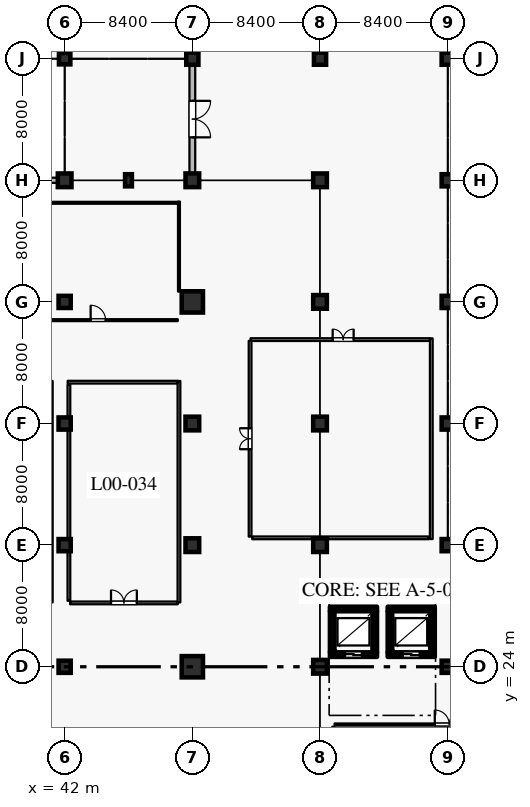
"""IFC4 building model, lengths in metres.
Left out: names, types, materials, properties, quantities, classifications, styles, units other than length and angle.
Written with IfcOpenShell. Run it as: python <this file> out.ifc"""

import sys

from ifc_helpers import new_model, si_unit, direction, frame, frame_2d, origin, origin_2d, place, context, subcontext, project, spatial, rectangle, circle, extrude, element, fill, save


model = new_model("IFC4")
c1 = context("Model", 3, precision=1e-05, world=origin(), true_north=direction((0.0, 1.0)))
c2 = subcontext(c1, "Body", "Model", "MODEL_VIEW")
j1 = project(units=[si_unit("LENGTHUNIT", "METRE"), si_unit("PLANEANGLEUNIT", "RADIAN")], contexts=[c1])
p1 = place(None, origin())
s1 = spatial("IfcSite", under=j1, at=p1, CompositionType="ELEMENT")
p2 = place(p1, origin())
s2 = spatial("IfcBuilding", under=s1, at=p2, CompositionType="ELEMENT")
p3 = place(p2, origin())
s3 = spatial("IfcBuildingStorey", under=s2, at=p3, CompositionType="ELEMENT", Elevation=0.0)
for number, where, z_axis, x_axis in (
    (1, (42.0, 24.0, 0.0), (0.0, 0.0, 1.0), (1.0, 0.0, 0.0)),
    (2, (42.0, 32.0, 0.0), (0.0, 0.0, 1.0), (1.0, 0.0, 0.0)),
    (3, (42.0, 40.0, 0.0), (0.0, 0.0, 1.0), (1.0, 0.0, 0.0)),
    (4, (42.0, 48.0, 0.0), (0.0, 0.0, 1.0), (1.0, 0.0, 0.0)),
):
    element("IfcColumn", number, at=place(p3, frame(where, z_axis=z_axis, x_axis=x_axis)), inside=s3, PredefinedType="COLUMN", context=c2, shape_type="SweptSolid", body=[
        extrude(rectangle(XDim=0.8, YDim=0.8, at=origin_2d()), origin(), (0.0, 0.0, 1.0), 6.0),
    ])
p4 = place(p3, frame((42.0, 56.0, 0.0), z_axis=(0.0, 0.0, 1.0), x_axis=(1.0, 0.0, 0.0)))
e5 = element("IfcColumn", 5, at=p4, inside=s3, PredefinedType="COLUMN", context=c2, shape_type="SweptSolid", body=[
    extrude(rectangle(XDim=0.9, YDim=0.9, at=origin_2d()), origin(), (0.0, 0.0, 1.0), 6.0),
])
p5 = place(p3, frame((42.0, 64.0, 0.0), z_axis=(0.0, 0.0, 1.0), x_axis=(1.0, 0.0, 0.0)))
e6 = element("IfcColumn", 6, at=p5, inside=s3, PredefinedType="COLUMN", context=c2, shape_type="SweptSolid", body=[
    extrude(rectangle(XDim=0.75, YDim=0.75, at=origin_2d()), origin(), (0.0, 0.0, 1.0), 6.0),
])
p6 = place(p3, frame((46.2, 56.0, 0.0), z_axis=(0.0, 0.0, 1.0), x_axis=(1.0, 0.0, 0.0)))
e7 = element("IfcColumn", 7, at=p6, inside=s3, PredefinedType="PILASTER", context=c2, shape_type="SweptSolid", body=[
    extrude(rectangle(XDim=0.45, YDim=0.8, at=origin_2d()), origin(), (0.0, 0.0, 1.0), 6.0),
])
p7 = place(p3, frame((50.4, 24.0, 0.0), z_axis=(0.0, 0.0, 1.0), x_axis=(1.0, 0.0, 0.0)))
e8 = element("IfcColumn", 8, at=p7, inside=s3, PredefinedType="COLUMN", context=c2, shape_type="SweptSolid", body=[
    extrude(circle(Radius=0.7, at=origin_2d()), origin(), (0.0, 0.0, 1.0), 6.0),
])
for number, where, z_axis, x_axis in (
    (9, (50.4, 32.0, 0.0), (0.0, 0.0, 1.0), (1.0, 0.0, 0.0)),
    (10, (50.4, 40.0, 0.0), (0.0, 0.0, 1.0), (1.0, 0.0, 0.0)),
):
    element("IfcColumn", number, at=place(p3, frame(where, z_axis=z_axis, x_axis=x_axis)), inside=s3, PredefinedType="COLUMN", context=c2, shape_type="SweptSolid", body=[
        extrude(rectangle(XDim=0.9, YDim=0.9, at=origin_2d()), origin(), (0.0, 0.0, 1.0), 6.0),
    ])
p8 = place(p3, frame((50.4, 48.0, 0.0), z_axis=(0.0, 0.0, 1.0), x_axis=(1.0, 0.0, 0.0)))
e11 = element("IfcColumn", 11, at=p8, inside=s3, PredefinedType="COLUMN", context=c2, shape_type="SweptSolid", body=[
    extrude(circle(Radius=0.7, at=origin_2d()), origin(), (0.0, 0.0, 1.0), 6.0),
])
p9 = place(p3, frame((50.4, 56.0, 0.0), z_axis=(0.0, 0.0, 1.0), x_axis=(1.0, 0.0, 0.0)))
e12 = element("IfcColumn", 12, at=p9, inside=s3, PredefinedType="COLUMN", context=c2, shape_type="SweptSolid", body=[
    extrude(rectangle(XDim=0.9, YDim=0.9, at=origin_2d()), origin(), (0.0, 0.0, 1.0), 6.0),
])
p10 = place(p3, frame((50.4, 64.0, 0.0), z_axis=(0.0, 0.0, 1.0), x_axis=(1.0, 0.0, 0.0)))
e13 = element("IfcColumn", 13, at=p10, inside=s3, PredefinedType="COLUMN", context=c2, shape_type="SweptSolid", body=[
    extrude(rectangle(XDim=0.8, YDim=0.8, at=origin_2d()), origin(), (0.0, 0.0, 1.0), 6.0),
])
for number, where, z_axis, x_axis in (
    (14, (58.8, 24.0, 0.0), (0.0, 0.0, 1.0), (1.0, 0.0, 0.0)),
    (15, (58.8, 32.0, 0.0), (0.0, 0.0, 1.0), (1.0, 0.0, 0.0)),
    (16, (58.8, 40.0, 0.0), (0.0, 0.0, 1.0), (1.0, 0.0, 0.0)),
    (17, (58.8, 48.0, 0.0), (0.0, 0.0, 1.0), (1.0, 0.0, 0.0)),
    (18, (58.8, 56.0, 0.0), (0.0, 0.0, 1.0), (1.0, 0.0, 0.0)),
):
    element("IfcColumn", number, at=place(p3, frame(where, z_axis=z_axis, x_axis=x_axis)), inside=s3, PredefinedType="COLUMN", context=c2, shape_type="SweptSolid", body=[
        extrude(rectangle(XDim=0.9, YDim=0.9, at=origin_2d()), origin(), (0.0, 0.0, 1.0), 6.0),
    ])
for number, where, z_axis, x_axis in (
    (19, (58.8, 64.0, 0.0), (0.0, 0.0, 1.0), (1.0, 0.0, 0.0)),
    (20, (67.2, 24.0, 0.0), (0.0, 0.0, 1.0), (1.0, 0.0, 0.0)),
    (21, (67.2, 32.0, 0.0), (0.0, 0.0, 1.0), (1.0, 0.0, 0.0)),
    (22, (67.2, 40.0, 0.0), (0.0, 0.0, 1.0), (1.0, 0.0, 0.0)),
    (23, (67.2, 48.0, 0.0), (0.0, 0.0, 1.0), (1.0, 0.0, 0.0)),
    (24, (67.2, 56.0, 0.0), (0.0, 0.0, 1.0), (1.0, 0.0, 0.0)),
    (25, (67.2, 64.0, 0.0), (0.0, 0.0, 1.0), (1.0, 0.0, 0.0)),
):
    element("IfcColumn", number, at=place(p3, frame(where, z_axis=z_axis, x_axis=x_axis)), inside=s3, PredefinedType="COLUMN", context=c2, shape_type="SweptSolid", body=[
        extrude(rectangle(XDim=0.8, YDim=0.8, at=origin_2d()), origin(), (0.0, 0.0, 1.0), 6.0),
    ])
p11 = place(p3, frame((38.025, 56.0, 0.0), z_axis=(0.0, 0.0, 1.0), x_axis=(1.0, 0.0, 0.0)))
e26 = element("IfcWall", 26, at=p11, inside=s3, PredefinedType="SOLIDWALL", context=c2, shape_type="SweptSolid", body=[
    extrude(rectangle(XDim=3.525, YDim=0.34, at=frame_2d((1.763, 0.0))), origin(), (0.0, 0.0, 1.0), 4.98),
])
p12 = place(p11, frame((0.812, 0.0, 1.25)))
e27 = element("IfcOpeningElement", 27, at=p12, cuts=e26, PredefinedType="OPENING", context=c2, shape_type="SweptSolid", body=[
    extrude(rectangle(XDim=1.9, YDim=1.4, at=frame_2d((0.95, 0.7))), frame((0.0, 0.18, 0.0), z_axis=(0.0, -1.0, 0.0), x_axis=(1.0, 0.0, 0.0)), (0.0, 0.0, 1.0), 0.36),
])
p13 = place(p3, frame((42.0, 71.625, 0.0), z_axis=(0.0, 0.0, 1.0), x_axis=(0.0, -1.0, 0.0)))
e28 = element("IfcWall", 28, at=p13, inside=s3, PredefinedType="SOLIDWALL", context=c2, shape_type="SweptSolid", body=[
    extrude(rectangle(XDim=7.25, YDim=0.28, at=frame_2d((3.625, 0.0))), origin(), (0.0, 0.0, 1.0), 5.0),
])
p14 = place(p13, frame((2.325, 0.0, 1.0)))
e29 = element("IfcOpeningElement", 29, at=p14, cuts=e28, PredefinedType="OPENING", context=c2, shape_type="SweptSolid", body=[
    extrude(rectangle(XDim=2.6, YDim=1.85, at=frame_2d((1.3, 0.925))), frame((0.0, 0.15, 0.0), z_axis=(0.0, -1.0, 0.0), x_axis=(1.0, 0.0, 0.0)), (0.0, 0.0, 1.0), 0.3),
])
p15 = place(p3, frame((50.4, 63.6, 0.0), z_axis=(0.0, 0.0, 1.0), x_axis=(0.0, -1.0, 0.0)))
e30 = element("IfcWall", 30, at=p15, inside=s3, PredefinedType="SOLIDWALL", context=c2, shape_type="SweptSolid", body=[
    extrude(rectangle(XDim=7.15, YDim=0.38, at=frame_2d((3.575, 0.0))), origin(), (0.0, 0.0, 1.0), 5.0),
])
p16 = place(p15, frame((2.375, 0.0, 0.0)))
e31 = element("IfcOpeningElement", 31, at=p16, cuts=e30, PredefinedType="OPENING", context=c2, shape_type="SweptSolid", body=[
    extrude(rectangle(XDim=2.4, YDim=2.6, at=frame_2d((1.2, 1.3))), frame((0.0, 0.2, 0.0), z_axis=(0.0, -1.0, 0.0), x_axis=(1.0, 0.0, 0.0)), (0.0, 0.0, 1.0), 0.4),
])
p17 = place(p3, frame((50.4, 64.4, 0.0), z_axis=(0.0, 0.0, 1.0), x_axis=(0.0, 1.0, 0.0)))
e32 = element("IfcWall", 32, at=p17, inside=s3, PredefinedType="SOLIDWALL", context=c2, shape_type="SweptSolid", body=[
    extrude(rectangle(XDim=7.2, YDim=0.38, at=frame_2d((3.6, 0.0))), origin(), (0.0, 0.0, 1.0), 5.7),
])
p18 = place(p17, frame((2.2, 0.0, 0.0)))
e33 = element("IfcOpeningElement", 33, at=p18, cuts=e32, PredefinedType="OPENING", context=c2, shape_type="SweptSolid", body=[
    extrude(rectangle(XDim=2.8, YDim=2.8, at=frame_2d((1.4, 1.4))), frame((0.0, 0.2, 0.0), z_axis=(0.0, -1.0, 0.0), x_axis=(1.0, 0.0, 0.0)), (0.0, 0.0, 1.0), 0.4),
])
p19 = place(p3, frame((59.45, 24.8, 0.0), z_axis=(0.0, 0.0, 1.0), x_axis=(1.0, 0.0, 0.0)))
e34 = element("IfcWall", 34, at=p19, inside=s3, PredefinedType="SHEAR", context=c2, shape_type="SweptSolid", body=[
    extrude(rectangle(XDim=3.1, YDim=0.3, at=frame_2d((1.55, 0.0))), origin(), (0.0, 0.0, 1.0), 5.675),
])
p20 = place(p19, frame((1.0, 0.0, 0.0)))
e35 = element("IfcOpeningElement", 35, at=p20, cuts=e34, PredefinedType="OPENING", context=c2, shape_type="SweptSolid", body=[
    extrude(rectangle(XDim=1.1, YDim=2.2, at=frame_2d((0.55, 1.1))), frame((0.0, 0.16, 0.0), z_axis=(0.0, -1.0, 0.0), x_axis=(1.0, 0.0, 0.0)), (0.0, 0.0, 1.0), 0.32),
])
p21 = place(p3, frame((62.4, 24.955, 0.0), z_axis=(0.0, 0.0, 1.0), x_axis=(0.0, 1.0, 0.0)))
e36 = element("IfcWall", 36, at=p21, inside=s3, PredefinedType="SHEAR", context=c2, shape_type="SweptSolid", body=[
    extrude(rectangle(XDim=2.69, YDim=0.3, at=frame_2d((1.345, 0.0))), origin(), (0.0, 0.0, 1.0), 5.675),
])
p22 = place(p3, frame((62.55, 27.8, 0.0), z_axis=(0.0, 0.0, 1.0), x_axis=(-1.0, 0.0, 0.0)))
e37 = element("IfcWall", 37, at=p22, inside=s3, PredefinedType="SHEAR", context=c2, shape_type="SweptSolid", body=[
    extrude(rectangle(XDim=3.1, YDim=0.3, at=frame_2d((1.55, 0.0))), origin(), (0.0, 0.0, 1.0), 5.675),
])
p23 = place(p3, frame((59.6, 27.645, 0.0), z_axis=(0.0, 0.0, 1.0), x_axis=(0.0, -1.0, 0.0)))
e38 = element("IfcWall", 38, at=p23, inside=s3, PredefinedType="SHEAR", context=c2, shape_type="SweptSolid", body=[
    extrude(rectangle(XDim=2.69, YDim=0.3, at=frame_2d((1.345, 0.0))), origin(), (0.0, 0.0, 1.0), 5.675),
])
p24 = place(p3, frame((63.25, 24.8, 0.0), z_axis=(0.0, 0.0, 1.0), x_axis=(1.0, 0.0, 0.0)))
e39 = element("IfcWall", 39, at=p24, inside=s3, PredefinedType="SHEAR", context=c2, shape_type="SweptSolid", body=[
    extrude(rectangle(XDim=3.1, YDim=0.3, at=frame_2d((1.55, 0.0))), origin(), (0.0, 0.0, 1.0), 5.675),
])
p25 = place(p24, frame((1.0, 0.0, 0.0)))
e40 = element("IfcOpeningElement", 40, at=p25, cuts=e39, PredefinedType="OPENING", context=c2, shape_type="SweptSolid", body=[
    extrude(rectangle(XDim=1.1, YDim=2.2, at=frame_2d((0.55, 1.1))), frame((0.0, 0.16, 0.0), z_axis=(0.0, -1.0, 0.0), x_axis=(1.0, 0.0, 0.0)), (0.0, 0.0, 1.0), 0.32),
])
p26 = place(p3, frame((66.2, 24.955, 0.0), z_axis=(0.0, 0.0, 1.0), x_axis=(0.0, 1.0, 0.0)))
e41 = element("IfcWall", 41, at=p26, inside=s3, PredefinedType="SHEAR", context=c2, shape_type="SweptSolid", body=[
    extrude(rectangle(XDim=2.69, YDim=0.3, at=frame_2d((1.345, 0.0))), origin(), (0.0, 0.0, 1.0), 5.675),
])
p27 = place(p3, frame((66.35, 27.8, 0.0), z_axis=(0.0, 0.0, 1.0), x_axis=(-1.0, 0.0, 0.0)))
e42 = element("IfcWall", 42, at=p27, inside=s3, PredefinedType="SHEAR", context=c2, shape_type="SweptSolid", body=[
    extrude(rectangle(XDim=3.1, YDim=0.3, at=frame_2d((1.55, 0.0))), origin(), (0.0, 0.0, 1.0), 5.675),
])
p28 = place(p3, frame((63.4, 27.645, 0.0), z_axis=(0.0, 0.0, 1.0), x_axis=(0.0, -1.0, 0.0)))
e43 = element("IfcWall", 43, at=p28, inside=s3, PredefinedType="SHEAR", context=c2, shape_type="SweptSolid", body=[
    extrude(rectangle(XDim=2.69, YDim=0.3, at=frame_2d((1.345, 0.0))), origin(), (0.0, 0.0, 1.0), 5.675),
])
p29 = place(p3, frame((42.36, 28.2, 0.0), z_axis=(0.0, 0.0, 1.0), x_axis=(1.0, 0.0, 0.0)))
e44 = element("IfcWall", 44, at=p29, inside=s3, PredefinedType="PARTITIONING", context=c2, shape_type="SweptSolid", body=[
    extrude(rectangle(XDim=7.08, YDim=0.18, at=frame_2d((3.54, 0.0))), origin(), (0.0, 0.0, 1.0), 5.675),
])
p30 = place(p29, frame((2.69, 0.0, 0.0)))
e45 = element("IfcOpeningElement", 45, at=p30, cuts=e44, PredefinedType="OPENING", context=c2, shape_type="SweptSolid", body=[
    extrude(rectangle(XDim=1.7, YDim=2.3, at=frame_2d((0.85, 1.15))), frame((0.0, 0.1, 0.0), z_axis=(0.0, -1.0, 0.0), x_axis=(1.0, 0.0, 0.0)), (0.0, 0.0, 1.0), 0.2),
])
p31 = place(p3, frame((42.28, 28.34, 0.0), z_axis=(0.0, 0.0, 1.0), x_axis=(0.0, 1.0, 0.0)))
e46 = element("IfcWall", 46, at=p31, inside=s3, PredefinedType="PARTITIONING", context=c2, shape_type="SweptSolid", body=[
    extrude(rectangle(XDim=14.21, YDim=0.18, at=frame_2d((7.105, 0.0))), origin(), (0.0, 0.0, 1.0), 5.675),
])
p32 = place(p3, frame((38.96, 46.8, 0.0), z_axis=(0.0, 0.0, 1.0), x_axis=(1.0, 0.0, 0.0)))
e47 = element("IfcWall", 47, at=p32, inside=s3, PredefinedType="PARTITIONING", context=c2, shape_type="SweptSolid", body=[
    extrude(rectangle(XDim=10.48, YDim=0.125, at=frame_2d((5.24, 0.0))), origin(), (0.0, 0.0, 1.0), 5.675),
])
p33 = place(p32, frame((4.75, 0.0, 0.0)))
e48 = element("IfcOpeningElement", 48, at=p33, cuts=e47, PredefinedType="OPENING", context=c2, shape_type="SweptSolid", body=[
    extrude(rectangle(XDim=0.98, YDim=2.15, at=frame_2d((0.49, 1.075))), frame((0.0, 0.073, 0.0), z_axis=(0.0, -1.0, 0.0), x_axis=(1.0, 0.0, 0.0)), (0.0, 0.0, 1.0), 0.145),
])
p34 = place(p3, frame((59.76, 20.2, 0.0), z_axis=(0.0, 0.0, 1.0), x_axis=(1.0, 0.0, 0.0)))
e49 = element("IfcWall", 49, at=p34, inside=s3, PredefinedType="PARTITIONING", context=c2, shape_type="SweptSolid", body=[
    extrude(rectangle(XDim=15.08, YDim=0.14, at=frame_2d((7.54, 0.0))), origin(), (0.0, 0.0, 1.0), 5.675),
])
p35 = place(p34, frame((6.59, 0.0, 0.0)))
e50 = element("IfcOpeningElement", 50, at=p35, cuts=e49, PredefinedType="OPENING", context=c2, shape_type="SweptSolid", body=[
    extrude(rectangle(XDim=1.9, YDim=2.4, at=frame_2d((0.95, 1.2))), frame((0.0, 0.08, 0.0), z_axis=(0.0, -1.0, 0.0), x_axis=(1.0, 0.0, 0.0)), (0.0, 0.0, 1.0), 0.16),
])
p36 = place(p3, frame((59.68, 9.05, 0.0), z_axis=(0.0, 0.0, 1.0), x_axis=(0.0, 1.0, 0.0)))
e51 = element("IfcWall", 51, at=p36, inside=s3, PredefinedType="PARTITIONING", context=c2, shape_type="SweptSolid", body=[
    extrude(rectangle(XDim=11.01, YDim=0.14, at=frame_2d((5.505, 0.0))), origin(), (0.0, 0.0, 1.0), 5.675),
])
p37 = place(p3, frame((54.2, 32.56, 0.0), z_axis=(0.0, 0.0, 1.0), x_axis=(0.0, 1.0, 0.0)))
e52 = element("IfcWall", 52, at=p37, inside=s3, PredefinedType="PARTITIONING", context=c2, shape_type="SweptSolid", body=[
    extrude(rectangle(XDim=12.88, YDim=0.18, at=frame_2d((6.44, 0.0))), origin(), (0.0, 0.0, 1.0), 5.675),
])
p38 = place(p37, frame((5.75, 0.0, 0.0)))
e53 = element("IfcOpeningElement", 53, at=p38, cuts=e52, PredefinedType="OPENING", context=c2, shape_type="SweptSolid", body=[
    extrude(rectangle(XDim=1.38, YDim=2.3, at=frame_2d((0.69, 1.15))), frame((0.0, 0.1, 0.0), z_axis=(0.0, -1.0, 0.0), x_axis=(1.0, 0.0, 0.0)), (0.0, 0.0, 1.0), 0.2),
])
p39 = place(p3, frame((54.34, 32.48, 0.0), z_axis=(0.0, 0.0, 1.0), x_axis=(1.0, 0.0, 0.0)))
e54 = element("IfcWall", 54, at=p39, inside=s3, PredefinedType="PARTITIONING", context=c2, shape_type="SweptSolid", body=[
    extrude(rectangle(XDim=11.61, YDim=0.18, at=frame_2d((5.805, 0.0))), origin(), (0.0, 0.0, 1.0), 5.675),
])
for number, where, z_axis, x_axis in (
    (55, (41.12, 28.232, 0.0), (0.0, 0.0, 1.0), (0.0, 1.0, 0.0)),
    (56, (49.52, 28.232, 0.0), (0.0, 0.0, 1.0), (0.0, 1.0, 0.0)),
):
    element("IfcWall", number, at=place(p3, frame(where, z_axis=z_axis, x_axis=x_axis)), inside=s3, PredefinedType="PARTITIONING", context=c2, shape_type="SweptSolid", body=[
        extrude(rectangle(XDim=14.568, YDim=0.18, at=frame_2d((7.284, 0.0))), origin(), (0.0, 0.0, 1.0), 5.675),
    ])
p40 = place(p3, frame((42.2, 42.72, 0.0), z_axis=(0.0, 0.0, 1.0), x_axis=(1.0, 0.0, 0.0)))
e57 = element("IfcWall", 57, at=p40, inside=s3, PredefinedType="PARTITIONING", context=c2, shape_type="SweptSolid", body=[
    extrude(rectangle(XDim=7.23, YDim=0.18, at=frame_2d((3.615, 0.0))), origin(), (0.0, 0.0, 1.0), 5.675),
])
p41 = place(p3, frame((49.52, 48.679, 0.0), z_axis=(0.0, 0.0, 1.0), x_axis=(0.0, 1.0, 0.0)))
e58 = element("IfcWall", 58, at=p41, inside=s3, PredefinedType="PARTITIONING", context=c2, shape_type="SweptSolid", body=[
    extrude(rectangle(XDim=5.921, YDim=0.125, at=frame_2d((2.96, 0.0))), origin(), (0.0, 0.0, 1.0), 5.675),
])
p42 = place(p3, frame((38.8, 54.52, 0.0), z_axis=(0.0, 0.0, 1.0), x_axis=(1.0, 0.0, 0.0)))
e59 = element("IfcWall", 59, at=p42, inside=s3, PredefinedType="PARTITIONING", context=c2, shape_type="SweptSolid", body=[
    extrude(rectangle(XDim=10.658, YDim=0.125, at=frame_2d((5.329, 0.0))), origin(), (0.0, 0.0, 1.0), 5.675),
])
p43 = place(p3, frame((66.12, 32.4, 0.0), z_axis=(0.0, 0.0, 1.0), x_axis=(0.0, 1.0, 0.0)))
e60 = element("IfcWall", 60, at=p43, inside=s3, PredefinedType="PARTITIONING", context=c2, shape_type="SweptSolid", body=[
    extrude(rectangle(XDim=13.2, YDim=0.18, at=frame_2d((6.6, 0.0))), origin(), (0.0, 0.0, 1.0), 5.675),
])
p44 = place(p3, frame((54.232, 45.52, 0.0), z_axis=(0.0, 0.0, 1.0), x_axis=(1.0, 0.0, 0.0)))
e61 = element("IfcWall", 61, at=p44, inside=s3, PredefinedType="PARTITIONING", context=c2, shape_type="SweptSolid", body=[
    extrude(rectangle(XDim=11.798, YDim=0.18, at=frame_2d((5.899, 0.0))), origin(), (0.0, 0.0, 1.0), 5.675),
])
p45 = place(p44, frame((5.4, 0.0, 0.0)))
e62 = element("IfcOpeningElement", 62, at=p45, cuts=e61, PredefinedType="OPENING", context=c2, shape_type="SweptSolid", body=[
    extrude(rectangle(XDim=1.38, YDim=2.3, at=frame_2d((0.69, 1.15))), frame((0.0, 0.1, 0.0), z_axis=(0.0, -1.0, 0.0), x_axis=(1.0, 0.0, 0.0)), (0.0, 0.0, 1.0), 0.2),
])
p46 = place(p16, origin())
e63 = element("IfcDoor", 63, at=p46, inside=s3, OperationType="DOUBLE_DOOR_SINGLE_SWING", PredefinedType="DOOR", context=c2, shape_type="SweptSolid", body=[
    extrude(rectangle(XDim=2.4, YDim=2.6, at=frame_2d((1.2, 1.3))), frame((0.0, 0.025, 0.0), z_axis=(0.0, -1.0, 0.0), x_axis=(1.0, 0.0, 0.0)), (0.0, 0.0, 1.0), 0.05),
])
fill(e31, e63)
p47 = place(p20, origin())
e64 = element("IfcDoor", 64, at=p47, inside=s3, OperationType="DOUBLE_DOOR_SLIDING", PredefinedType="DOOR", context=c2, shape_type="SweptSolid", body=[
    extrude(rectangle(XDim=1.1, YDim=2.2, at=frame_2d((0.55, 1.1))), frame((0.0, 0.025, 0.0), z_axis=(0.0, -1.0, 0.0), x_axis=(1.0, 0.0, 0.0)), (0.0, 0.0, 1.0), 0.05),
])
fill(e35, e64)
p48 = place(p25, origin())
e65 = element("IfcDoor", 65, at=p48, inside=s3, OperationType="DOUBLE_DOOR_SLIDING", PredefinedType="DOOR", context=c2, shape_type="SweptSolid", body=[
    extrude(rectangle(XDim=1.1, YDim=2.2, at=frame_2d((0.55, 1.1))), frame((0.0, 0.025, 0.0), z_axis=(0.0, -1.0, 0.0), x_axis=(1.0, 0.0, 0.0)), (0.0, 0.0, 1.0), 0.05),
])
fill(e40, e65)
p49 = place(p30, origin())
e66 = element("IfcDoor", 66, at=p49, inside=s3, OperationType="DOUBLE_DOOR_SINGLE_SWING", PredefinedType="DOOR", context=c2, shape_type="SweptSolid", body=[
    extrude(rectangle(XDim=1.7, YDim=2.3, at=frame_2d((0.85, 1.15))), frame((0.0, 0.025, 0.0), z_axis=(0.0, -1.0, 0.0), x_axis=(1.0, 0.0, 0.0)), (0.0, 0.0, 1.0), 0.05),
])
fill(e45, e66)
p50 = place(p33, origin())
e67 = element("IfcDoor", 67, at=p50, inside=s3, OperationType="SINGLE_SWING_LEFT", PredefinedType="DOOR", context=c2, shape_type="SweptSolid", body=[
    extrude(rectangle(XDim=0.98, YDim=2.15, at=frame_2d((0.49, 1.075))), frame((0.0, 0.025, 0.0), z_axis=(0.0, -1.0, 0.0), x_axis=(1.0, 0.0, 0.0)), (0.0, 0.0, 1.0), 0.05),
])
fill(e48, e67)
p51 = place(p35, origin())
e68 = element("IfcDoor", 68, at=p51, inside=s3, OperationType="DOUBLE_DOOR_SINGLE_SWING", PredefinedType="DOOR", context=c2, shape_type="SweptSolid", body=[
    extrude(rectangle(XDim=1.9, YDim=2.4, at=frame_2d((0.95, 1.2))), frame((0.0, 0.025, 0.0), z_axis=(0.0, -1.0, 0.0), x_axis=(1.0, 0.0, 0.0)), (0.0, 0.0, 1.0), 0.05),
])
fill(e50, e68)
p52 = place(p38, origin())
e69 = element("IfcDoor", 69, at=p52, inside=s3, OperationType="DOUBLE_DOOR_SINGLE_SWING", PredefinedType="DOOR", context=c2, shape_type="SweptSolid", body=[
    extrude(rectangle(XDim=1.38, YDim=2.3, at=frame_2d((0.69, 1.15))), frame((0.0, 0.025, 0.0), z_axis=(0.0, -1.0, 0.0), x_axis=(1.0, 0.0, 0.0)), (0.0, 0.0, 1.0), 0.05),
])
fill(e53, e69)
p53 = place(p45, origin())
e70 = element("IfcDoor", 70, at=p53, inside=s3, OperationType="DOUBLE_DOOR_SINGLE_SWING", PredefinedType="DOOR", context=c2, shape_type="SweptSolid", body=[
    extrude(rectangle(XDim=1.38, YDim=2.3, at=frame_2d((0.69, 1.15))), frame((0.0, 0.025, 0.0), z_axis=(0.0, -1.0, 0.0), x_axis=(1.0, 0.0, 0.0)), (0.0, 0.0, 1.0), 0.05),
])
fill(e62, e70)
save(model, sys.argv[1])
